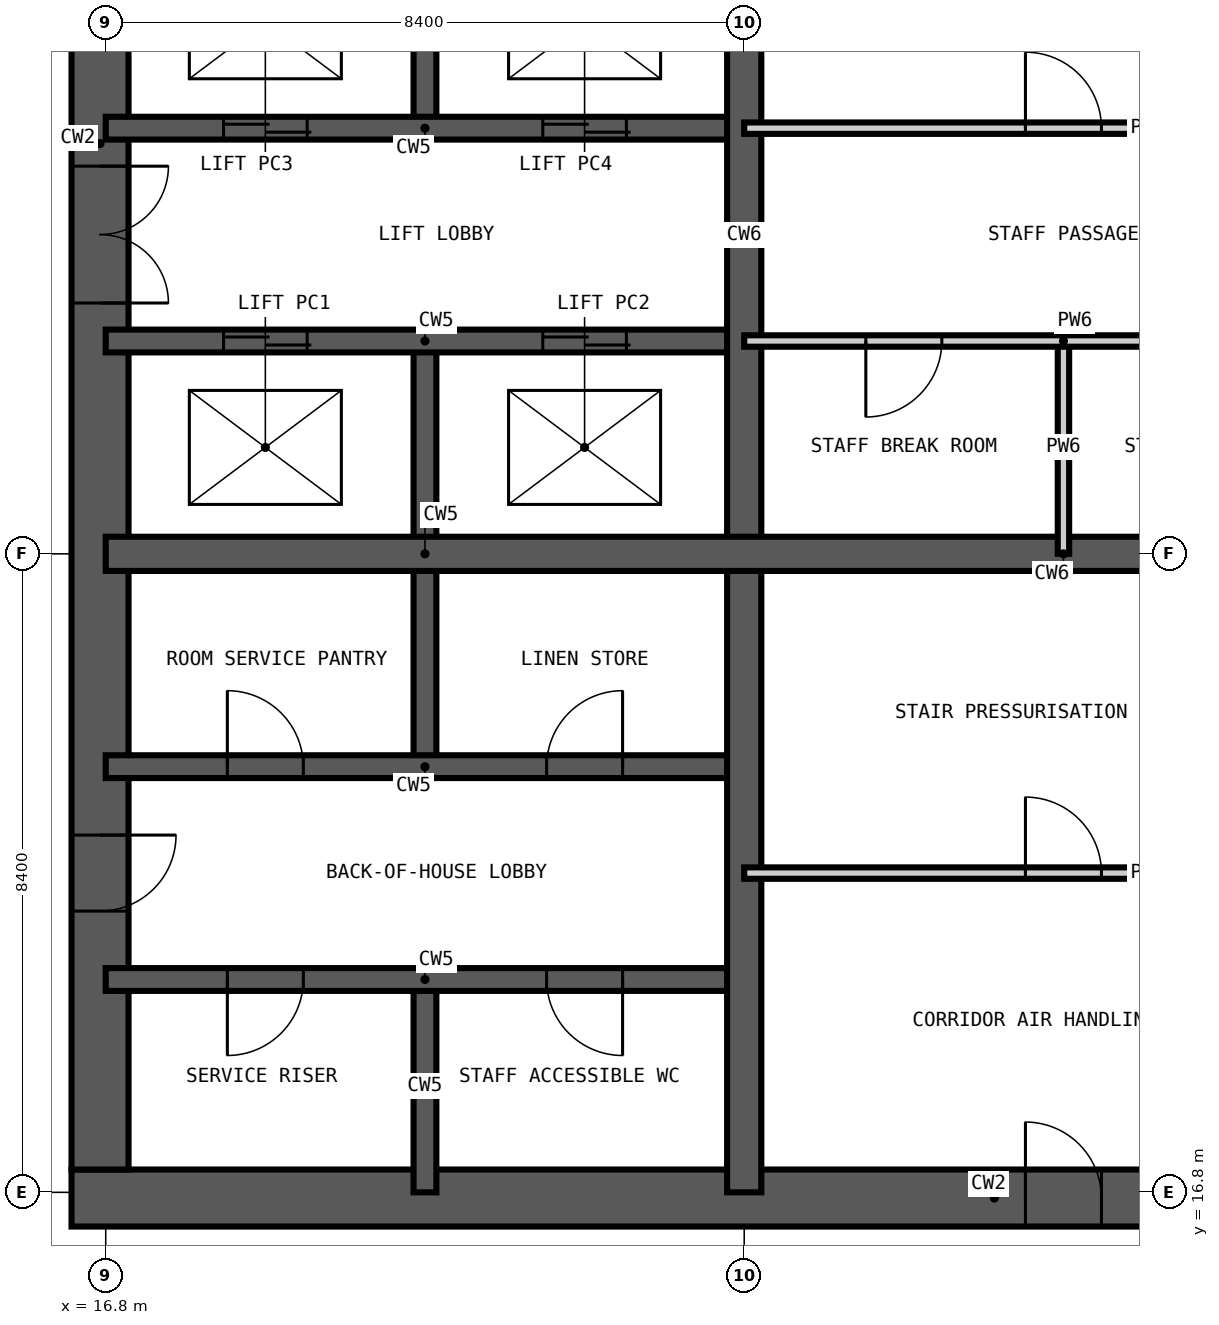
"""IFC4 building model, lengths in metres.
Left out: names, types, materials, properties, quantities, classifications, styles, units other than length and angle.
Written with IfcOpenShell. Run it as: python <this file> out.ifc"""

import sys

from ifc_helpers import new_model, si_unit, direction, frame, frame_2d, origin, place, context, subcontext, project, spatial, rectangle, extrude, element, fill, save


model = new_model("IFC4")
c1 = context("Model", 3, precision=1e-05, world=origin(), true_north=direction((0.0, 1.0)))
c2 = subcontext(c1, "Body", "Model", "MODEL_VIEW")
j1 = project(units=[si_unit("LENGTHUNIT", "METRE"), si_unit("PLANEANGLEUNIT", "RADIAN")], contexts=[c1])
p1 = place(None, origin())
s1 = spatial("IfcSite", under=j1, at=p1, CompositionType="ELEMENT")
p2 = place(p1, origin())
s2 = spatial("IfcBuilding", under=s1, at=p2, CompositionType="ELEMENT")
p3 = place(p2, frame((0.0, 0.0, 177.0)))
s3 = spatial("IfcBuildingStorey", under=s2, at=p3, CompositionType="ELEMENT", Elevation=177.0)
p4 = place(p3, frame((16.35, 16.725, -0.35), z_axis=(0.0, 0.0, 1.0), x_axis=(1.0, 0.0, 0.0)))
e1 = element("IfcWall", 1, at=p4, inside=s3, PredefinedType="SHEAR", context=c2, shape_type="SweptSolid", body=[
    extrude(rectangle(XDim=26.1, YDim=0.75, at=frame_2d((13.05, 0.0))), origin(), (0.0, 0.0, 1.0), 3.6),
])
p5 = place(p4, frame((12.55, 0.0, 0.35)))
e2 = element("IfcOpeningElement", 2, at=p5, cuts=e1, PredefinedType="OPENING", context=c2, shape_type="SweptSolid", body=[
    extrude(rectangle(XDim=1.0, YDim=2.1, at=frame_2d((0.5, 1.05))), frame((0.0, 0.385, 0.0), z_axis=(0.0, -1.0, 0.0), x_axis=(1.0, 0.0, 0.0)), (0.0, 0.0, 1.0), 0.77),
])
p6 = place(p4, frame((18.85, 0.0, 0.35)))
e3 = element("IfcOpeningElement", 3, at=p6, cuts=e1, PredefinedType="OPENING", context=c2, shape_type="SweptSolid", body=[
    extrude(rectangle(XDim=1.0, YDim=2.1, at=frame_2d((0.5, 1.05))), frame((0.0, 0.385, 0.0), z_axis=(0.0, -1.0, 0.0), x_axis=(1.0, 0.0, 0.0)), (0.0, 0.0, 1.0), 0.77),
])
p7 = place(p3, frame((16.725, 41.7, -0.35), z_axis=(0.0, 0.0, 1.0), x_axis=(0.0, -1.0, 0.0)))
e4 = element("IfcWall", 4, at=p7, inside=s3, PredefinedType="SHEAR", context=c2, shape_type="SweptSolid", body=[
    extrude(rectangle(XDim=24.6, YDim=0.75, at=frame_2d((12.3, 0.0))), origin(), (0.0, 0.0, 1.0), 3.6),
])
p8 = place(p7, frame((11.4, 0.0, 0.35)))
e5 = element("IfcOpeningElement", 5, at=p8, cuts=e4, PredefinedType="OPENING", context=c2, shape_type="SweptSolid", body=[
    extrude(rectangle(XDim=1.8, YDim=2.2, at=frame_2d((0.9, 1.1))), frame((0.0, 0.385, 0.0), z_axis=(0.0, -1.0, 0.0), x_axis=(1.0, 0.0, 0.0)), (0.0, 0.0, 1.0), 0.77),
])
p9 = place(p7, frame((20.2, 0.0, 0.35)))
e6 = element("IfcOpeningElement", 6, at=p9, cuts=e4, PredefinedType="OPENING", context=c2, shape_type="SweptSolid", body=[
    extrude(rectangle(XDim=1.0, YDim=2.1, at=frame_2d((0.5, 1.05))), frame((0.0, 0.385, 0.0), z_axis=(0.0, -1.0, 0.0), x_axis=(1.0, 0.0, 0.0)), (0.0, 0.0, 1.0), 0.77),
])
p10 = place(p7, frame((5.5, 0.0, 0.35)))
e7 = element("IfcOpeningElement", 7, at=p10, cuts=e4, PredefinedType="OPENING", context=c2, shape_type="SweptSolid", body=[
    extrude(rectangle(XDim=1.0, YDim=2.1, at=frame_2d((0.5, 1.05))), frame((0.0, 0.385, 0.0), z_axis=(0.0, -1.0, 0.0), x_axis=(1.0, 0.0, 0.0)), (0.0, 0.0, 1.0), 0.77),
])
p11 = place(p3, frame((21.0, 16.8, -0.35), z_axis=(0.0, 0.0, 1.0), x_axis=(0.0, 1.0, 0.0)))
e8 = element("IfcWall", 8, at=p11, inside=s3, PredefinedType="SHEAR", context=c2, shape_type="SweptSolid", body=[
    extrude(rectangle(XDim=2.8, YDim=0.3, at=frame_2d((1.4, 0.0))), origin(), (0.0, 0.0, 1.0), 3.6),
])
p12 = place(p3, frame((21.0, 22.4, -0.35), z_axis=(0.0, 0.0, 1.0), x_axis=(0.0, 1.0, 0.0)))
e9 = element("IfcWall", 9, at=p12, inside=s3, PredefinedType="SHEAR", context=c2, shape_type="SweptSolid", body=[
    extrude(rectangle(XDim=5.6, YDim=0.3, at=frame_2d((2.8, 0.0))), origin(), (0.0, 0.0, 1.0), 3.6),
])
p13 = place(p3, frame((21.0, 30.8, -0.35), z_axis=(0.0, 0.0, 1.0), x_axis=(0.0, 1.0, 0.0)))
e10 = element("IfcWall", 10, at=p13, inside=s3, PredefinedType="SHEAR", context=c2, shape_type="SweptSolid", body=[
    extrude(rectangle(XDim=2.8, YDim=0.3, at=frame_2d((1.4, 0.0))), origin(), (0.0, 0.0, 1.0), 3.6),
])
p14 = place(p3, frame((16.8, 19.6, -0.35), z_axis=(0.0, 0.0, 1.0), x_axis=(1.0, 0.0, 0.0)))
e11 = element("IfcWall", 11, at=p14, inside=s3, PredefinedType="SHEAR", context=c2, shape_type="SweptSolid", body=[
    extrude(rectangle(XDim=8.4, YDim=0.3, at=frame_2d((4.2, 0.0))), origin(), (0.0, 0.0, 1.0), 3.6),
])
p15 = place(p14, frame((1.6, 0.0, 0.35)))
e12 = element("IfcOpeningElement", 12, at=p15, cuts=e11, PredefinedType="OPENING", context=c2, shape_type="SweptSolid", body=[
    extrude(rectangle(XDim=1.0, YDim=2.1, at=frame_2d((0.5, 1.05))), frame((0.0, 0.16, 0.0), z_axis=(0.0, -1.0, 0.0), x_axis=(1.0, 0.0, 0.0)), (0.0, 0.0, 1.0), 0.32),
])
p16 = place(p14, frame((5.8, 0.0, 0.35)))
e13 = element("IfcOpeningElement", 13, at=p16, cuts=e11, PredefinedType="OPENING", context=c2, shape_type="SweptSolid", body=[
    extrude(rectangle(XDim=1.0, YDim=2.1, at=frame_2d((0.5, 1.05))), frame((0.0, 0.16, 0.0), z_axis=(0.0, -1.0, 0.0), x_axis=(1.0, 0.0, 0.0)), (0.0, 0.0, 1.0), 0.32),
])
p17 = place(p3, frame((16.8, 22.4, -0.35), z_axis=(0.0, 0.0, 1.0), x_axis=(1.0, 0.0, 0.0)))
e14 = element("IfcWall", 14, at=p17, inside=s3, PredefinedType="SHEAR", context=c2, shape_type="SweptSolid", body=[
    extrude(rectangle(XDim=8.4, YDim=0.3, at=frame_2d((4.2, 0.0))), origin(), (0.0, 0.0, 1.0), 3.6),
])
p18 = place(p17, frame((1.6, 0.0, 0.35)))
e15 = element("IfcOpeningElement", 15, at=p18, cuts=e14, PredefinedType="OPENING", context=c2, shape_type="SweptSolid", body=[
    extrude(rectangle(XDim=1.0, YDim=2.1, at=frame_2d((0.5, 1.05))), frame((0.0, 0.16, 0.0), z_axis=(0.0, -1.0, 0.0), x_axis=(1.0, 0.0, 0.0)), (0.0, 0.0, 1.0), 0.32),
])
p19 = place(p17, frame((5.8, 0.0, 0.35)))
e16 = element("IfcOpeningElement", 16, at=p19, cuts=e14, PredefinedType="OPENING", context=c2, shape_type="SweptSolid", body=[
    extrude(rectangle(XDim=1.0, YDim=2.1, at=frame_2d((0.5, 1.05))), frame((0.0, 0.16, 0.0), z_axis=(0.0, -1.0, 0.0), x_axis=(1.0, 0.0, 0.0)), (0.0, 0.0, 1.0), 0.32),
])
p20 = place(p3, frame((16.8, 28.0, -0.35), z_axis=(0.0, 0.0, 1.0), x_axis=(1.0, 0.0, 0.0)))
e17 = element("IfcWall", 17, at=p20, inside=s3, PredefinedType="SHEAR", context=c2, shape_type="SweptSolid", body=[
    extrude(rectangle(XDim=8.4, YDim=0.3, at=frame_2d((4.2, 0.0))), origin(), (0.0, 0.0, 1.0), 3.6),
])
p21 = place(p20, frame((1.55, 0.0, 0.35)))
e18 = element("IfcOpeningElement", 18, at=p21, cuts=e17, PredefinedType="OPENING", context=c2, shape_type="SweptSolid", body=[
    extrude(rectangle(XDim=1.1, YDim=2.2, at=frame_2d((0.55, 1.1))), frame((0.0, 0.16, 0.0), z_axis=(0.0, -1.0, 0.0), x_axis=(1.0, 0.0, 0.0)), (0.0, 0.0, 1.0), 0.32),
])
p22 = place(p20, frame((5.75, 0.0, 0.35)))
e19 = element("IfcOpeningElement", 19, at=p22, cuts=e17, PredefinedType="OPENING", context=c2, shape_type="SweptSolid", body=[
    extrude(rectangle(XDim=1.1, YDim=2.2, at=frame_2d((0.55, 1.1))), frame((0.0, 0.16, 0.0), z_axis=(0.0, -1.0, 0.0), x_axis=(1.0, 0.0, 0.0)), (0.0, 0.0, 1.0), 0.32),
])
p23 = place(p3, frame((16.8, 30.8, -0.35), z_axis=(0.0, 0.0, 1.0), x_axis=(1.0, 0.0, 0.0)))
e20 = element("IfcWall", 20, at=p23, inside=s3, PredefinedType="SHEAR", context=c2, shape_type="SweptSolid", body=[
    extrude(rectangle(XDim=8.4, YDim=0.3, at=frame_2d((4.2, 0.0))), origin(), (0.0, 0.0, 1.0), 3.6),
])
p24 = place(p23, frame((1.55, 0.0, 0.35)))
e21 = element("IfcOpeningElement", 21, at=p24, cuts=e20, PredefinedType="OPENING", context=c2, shape_type="SweptSolid", body=[
    extrude(rectangle(XDim=1.1, YDim=2.2, at=frame_2d((0.55, 1.1))), frame((0.0, 0.16, 0.0), z_axis=(0.0, -1.0, 0.0), x_axis=(1.0, 0.0, 0.0)), (0.0, 0.0, 1.0), 0.32),
])
p25 = place(p23, frame((5.75, 0.0, 0.35)))
e22 = element("IfcOpeningElement", 22, at=p25, cuts=e20, PredefinedType="OPENING", context=c2, shape_type="SweptSolid", body=[
    extrude(rectangle(XDim=1.1, YDim=2.2, at=frame_2d((0.55, 1.1))), frame((0.0, 0.16, 0.0), z_axis=(0.0, -1.0, 0.0), x_axis=(1.0, 0.0, 0.0)), (0.0, 0.0, 1.0), 0.32),
])
for number, where, z_axis, x_axis in (
    (23, (25.2, 16.8, -0.35), (0.0, 0.0, 1.0), (0.0, 1.0, 0.0)),
    (24, (16.8, 25.2, -0.35), (0.0, 0.0, 1.0), (1.0, 0.0, 0.0)),
):
    element("IfcWall", number, at=place(p3, frame(where, z_axis=z_axis, x_axis=x_axis)), inside=s3, PredefinedType="SHEAR", context=c2, shape_type="SweptSolid", body=[
        extrude(rectangle(XDim=25.2, YDim=0.45, at=frame_2d((12.6, 0.0))), origin(), (0.0, 0.0, 1.0), 3.6),
    ])
p26 = place(p3, frame((29.4, 25.2, 0.0), z_axis=(0.0, 0.0, 1.0), x_axis=(0.0, 1.0, 0.0)))
e25 = element("IfcWall", 25, at=p26, inside=s3, PredefinedType="PARTITIONING", context=c2, shape_type="SweptSolid", body=[
    extrude(rectangle(XDim=2.8, YDim=0.15, at=frame_2d((1.4, 0.0))), origin(), (0.0, 0.0, 1.0), 3.25),
])
p27 = place(p3, frame((25.2, 21.0, 0.0), z_axis=(0.0, 0.0, 1.0), x_axis=(1.0, 0.0, 0.0)))
e26 = element("IfcWall", 26, at=p27, inside=s3, PredefinedType="PARTITIONING", context=c2, shape_type="SweptSolid", body=[
    extrude(rectangle(XDim=8.4, YDim=0.15, at=frame_2d((4.2, 0.0))), origin(), (0.0, 0.0, 1.0), 3.25),
])
p28 = place(p27, frame((3.7, 0.0, 0.0)))
e27 = element("IfcOpeningElement", 27, at=p28, cuts=e26, PredefinedType="OPENING", context=c2, shape_type="SweptSolid", body=[
    extrude(rectangle(XDim=1.0, YDim=2.1, at=frame_2d((0.5, 1.05))), frame((0.0, 0.085, 0.0), z_axis=(0.0, -1.0, 0.0), x_axis=(1.0, 0.0, 0.0)), (0.0, 0.0, 1.0), 0.17),
])
p29 = place(p3, frame((25.2, 28.0, 0.0), z_axis=(0.0, 0.0, 1.0), x_axis=(1.0, 0.0, 0.0)))
e28 = element("IfcWall", 28, at=p29, inside=s3, PredefinedType="PARTITIONING", context=c2, shape_type="SweptSolid", body=[
    extrude(rectangle(XDim=8.4, YDim=0.15, at=frame_2d((4.2, 0.0))), origin(), (0.0, 0.0, 1.0), 3.25),
])
p30 = place(p29, frame((5.8, 0.0, 0.0)))
e29 = element("IfcOpeningElement", 29, at=p30, cuts=e28, PredefinedType="OPENING", context=c2, shape_type="SweptSolid", body=[
    extrude(rectangle(XDim=1.0, YDim=2.1, at=frame_2d((0.5, 1.05))), frame((0.0, 0.085, 0.0), z_axis=(0.0, -1.0, 0.0), x_axis=(1.0, 0.0, 0.0)), (0.0, 0.0, 1.0), 0.17),
])
p31 = place(p29, frame((1.6, 0.0, 0.0)))
e30 = element("IfcOpeningElement", 30, at=p31, cuts=e28, PredefinedType="OPENING", context=c2, shape_type="SweptSolid", body=[
    extrude(rectangle(XDim=1.0, YDim=2.1, at=frame_2d((0.5, 1.05))), frame((0.0, 0.085, 0.0), z_axis=(0.0, -1.0, 0.0), x_axis=(1.0, 0.0, 0.0)), (0.0, 0.0, 1.0), 0.17),
])
p32 = place(p3, frame((25.2, 30.8, 0.0), z_axis=(0.0, 0.0, 1.0), x_axis=(1.0, 0.0, 0.0)))
e31 = element("IfcWall", 31, at=p32, inside=s3, PredefinedType="PARTITIONING", context=c2, shape_type="SweptSolid", body=[
    extrude(rectangle(XDim=8.4, YDim=0.15, at=frame_2d((4.2, 0.0))), origin(), (0.0, 0.0, 1.0), 3.25),
])
p33 = place(p32, frame((3.7, 0.0, 0.0)))
e32 = element("IfcOpeningElement", 32, at=p33, cuts=e31, PredefinedType="OPENING", context=c2, shape_type="SweptSolid", body=[
    extrude(rectangle(XDim=1.0, YDim=2.1, at=frame_2d((0.5, 1.05))), frame((0.0, 0.085, 0.0), z_axis=(0.0, -1.0, 0.0), x_axis=(1.0, 0.0, 0.0)), (0.0, 0.0, 1.0), 0.17),
])
p34 = place(p21, origin())
e33 = element("IfcDoor", 33, at=p34, inside=s3, OperationType="DOUBLE_DOOR_SLIDING", PredefinedType="DOOR", context=c2, shape_type="SweptSolid", body=[
    extrude(rectangle(XDim=1.1, YDim=2.2, at=frame_2d((0.55, 1.1))), frame((0.0, 0.025, 0.0), z_axis=(0.0, -1.0, 0.0), x_axis=(1.0, 0.0, 0.0)), (0.0, 0.0, 1.0), 0.05),
])
fill(e18, e33)
p35 = place(p22, origin())
e34 = element("IfcDoor", 34, at=p35, inside=s3, OperationType="DOUBLE_DOOR_SLIDING", PredefinedType="DOOR", context=c2, shape_type="SweptSolid", body=[
    extrude(rectangle(XDim=1.1, YDim=2.2, at=frame_2d((0.55, 1.1))), frame((0.0, 0.025, 0.0), z_axis=(0.0, -1.0, 0.0), x_axis=(1.0, 0.0, 0.0)), (0.0, 0.0, 1.0), 0.05),
])
fill(e19, e34)
p36 = place(p24, origin())
e35 = element("IfcDoor", 35, at=p36, inside=s3, OperationType="DOUBLE_DOOR_SLIDING", PredefinedType="DOOR", context=c2, shape_type="SweptSolid", body=[
    extrude(rectangle(XDim=1.1, YDim=2.2, at=frame_2d((0.55, 1.1))), frame((0.0, 0.025, 0.0), z_axis=(0.0, -1.0, 0.0), x_axis=(1.0, 0.0, 0.0)), (0.0, 0.0, 1.0), 0.05),
])
fill(e21, e35)
p37 = place(p25, origin())
e36 = element("IfcDoor", 36, at=p37, inside=s3, OperationType="DOUBLE_DOOR_SLIDING", PredefinedType="DOOR", context=c2, shape_type="SweptSolid", body=[
    extrude(rectangle(XDim=1.1, YDim=2.2, at=frame_2d((0.55, 1.1))), frame((0.0, 0.025, 0.0), z_axis=(0.0, -1.0, 0.0), x_axis=(1.0, 0.0, 0.0)), (0.0, 0.0, 1.0), 0.05),
])
fill(e22, e36)
p38 = place(p8, origin())
e37 = element("IfcDoor", 37, at=p38, inside=s3, OperationType="DOUBLE_DOOR_DOUBLE_SWING", PredefinedType="DOOR", context=c2, shape_type="SweptSolid", body=[
    extrude(rectangle(XDim=1.8, YDim=2.2, at=frame_2d((0.9, 1.1))), frame((0.0, 0.025, 0.0), z_axis=(0.0, -1.0, 0.0), x_axis=(1.0, 0.0, 0.0)), (0.0, 0.0, 1.0), 0.05),
])
fill(e5, e37)
p39 = place(p15, frame((1.0, 0.0, 0.0), z_axis=(0.0, 0.0, 1.0), x_axis=(-1.0, 0.0, 0.0)))
e38 = element("IfcDoor", 38, at=p39, inside=s3, OperationType="SINGLE_SWING_RIGHT", PredefinedType="DOOR", context=c2, shape_type="SweptSolid", body=[
    extrude(rectangle(XDim=1.0, YDim=2.1, at=frame_2d((0.5, 1.05))), frame((0.0, 0.025, 0.0), z_axis=(0.0, -1.0, 0.0), x_axis=(1.0, 0.0, 0.0)), (0.0, 0.0, 1.0), 0.05),
])
fill(e12, e38)
p40 = place(p16, frame((1.0, 0.0, 0.0), z_axis=(0.0, 0.0, 1.0), x_axis=(-1.0, 0.0, 0.0)))
e39 = element("IfcDoor", 39, at=p40, inside=s3, OperationType="SINGLE_SWING_LEFT", PredefinedType="DOOR", context=c2, shape_type="SweptSolid", body=[
    extrude(rectangle(XDim=1.0, YDim=2.1, at=frame_2d((0.5, 1.05))), frame((0.0, 0.025, 0.0), z_axis=(0.0, -1.0, 0.0), x_axis=(1.0, 0.0, 0.0)), (0.0, 0.0, 1.0), 0.05),
])
fill(e13, e39)
p41 = place(p18, origin())
e40 = element("IfcDoor", 40, at=p41, inside=s3, OperationType="SINGLE_SWING_LEFT", PredefinedType="DOOR", context=c2, shape_type="SweptSolid", body=[
    extrude(rectangle(XDim=1.0, YDim=2.1, at=frame_2d((0.5, 1.05))), frame((0.0, 0.025, 0.0), z_axis=(0.0, -1.0, 0.0), x_axis=(1.0, 0.0, 0.0)), (0.0, 0.0, 1.0), 0.05),
])
fill(e15, e40)
p42 = place(p19, origin())
e41 = element("IfcDoor", 41, at=p42, inside=s3, OperationType="SINGLE_SWING_RIGHT", PredefinedType="DOOR", context=c2, shape_type="SweptSolid", body=[
    extrude(rectangle(XDim=1.0, YDim=2.1, at=frame_2d((0.5, 1.05))), frame((0.0, 0.025, 0.0), z_axis=(0.0, -1.0, 0.0), x_axis=(1.0, 0.0, 0.0)), (0.0, 0.0, 1.0), 0.05),
])
fill(e16, e41)
p43 = place(p9, origin())
e42 = element("IfcDoor", 42, at=p43, inside=s3, OperationType="SINGLE_SWING_LEFT", PredefinedType="DOOR", context=c2, shape_type="SweptSolid", body=[
    extrude(rectangle(XDim=1.0, YDim=2.1, at=frame_2d((0.5, 1.05))), frame((0.0, 0.025, 0.0), z_axis=(0.0, -1.0, 0.0), x_axis=(1.0, 0.0, 0.0)), (0.0, 0.0, 1.0), 0.05),
])
fill(e6, e42)
p44 = place(p31, frame((1.0, 0.0, 0.0), z_axis=(0.0, 0.0, 1.0), x_axis=(-1.0, 0.0, 0.0)))
e43 = element("IfcDoor", 43, at=p44, inside=s3, OperationType="SINGLE_SWING_RIGHT", PredefinedType="DOOR", context=c2, shape_type="SweptSolid", body=[
    extrude(rectangle(XDim=1.0, YDim=2.1, at=frame_2d((0.5, 1.05))), frame((0.0, 0.025, 0.0), z_axis=(0.0, -1.0, 0.0), x_axis=(1.0, 0.0, 0.0)), (0.0, 0.0, 1.0), 0.05),
])
fill(e30, e43)
p45 = place(p33, origin())
e44 = element("IfcDoor", 44, at=p45, inside=s3, OperationType="SINGLE_SWING_LEFT", PredefinedType="DOOR", context=c2, shape_type="SweptSolid", body=[
    extrude(rectangle(XDim=1.0, YDim=2.1, at=frame_2d((0.5, 1.05))), frame((0.0, 0.025, 0.0), z_axis=(0.0, -1.0, 0.0), x_axis=(1.0, 0.0, 0.0)), (0.0, 0.0, 1.0), 0.05),
])
fill(e32, e44)
p46 = place(p5, origin())
e45 = element("IfcDoor", 45, at=p46, inside=s3, OperationType="SINGLE_SWING_LEFT", PredefinedType="DOOR", context=c2, shape_type="SweptSolid", body=[
    extrude(rectangle(XDim=1.0, YDim=2.1, at=frame_2d((0.5, 1.05))), frame((0.0, 0.025, 0.0), z_axis=(0.0, -1.0, 0.0), x_axis=(1.0, 0.0, 0.0)), (0.0, 0.0, 1.0), 0.05),
])
fill(e2, e45)
p47 = place(p28, origin())
e46 = element("IfcDoor", 46, at=p47, inside=s3, OperationType="SINGLE_SWING_LEFT", PredefinedType="DOOR", context=c2, shape_type="SweptSolid", body=[
    extrude(rectangle(XDim=1.0, YDim=2.1, at=frame_2d((0.5, 1.05))), frame((0.0, 0.025, 0.0), z_axis=(0.0, -1.0, 0.0), x_axis=(1.0, 0.0, 0.0)), (0.0, 0.0, 1.0), 0.05),
])
fill(e27, e46)
save(model, sys.argv[1])
